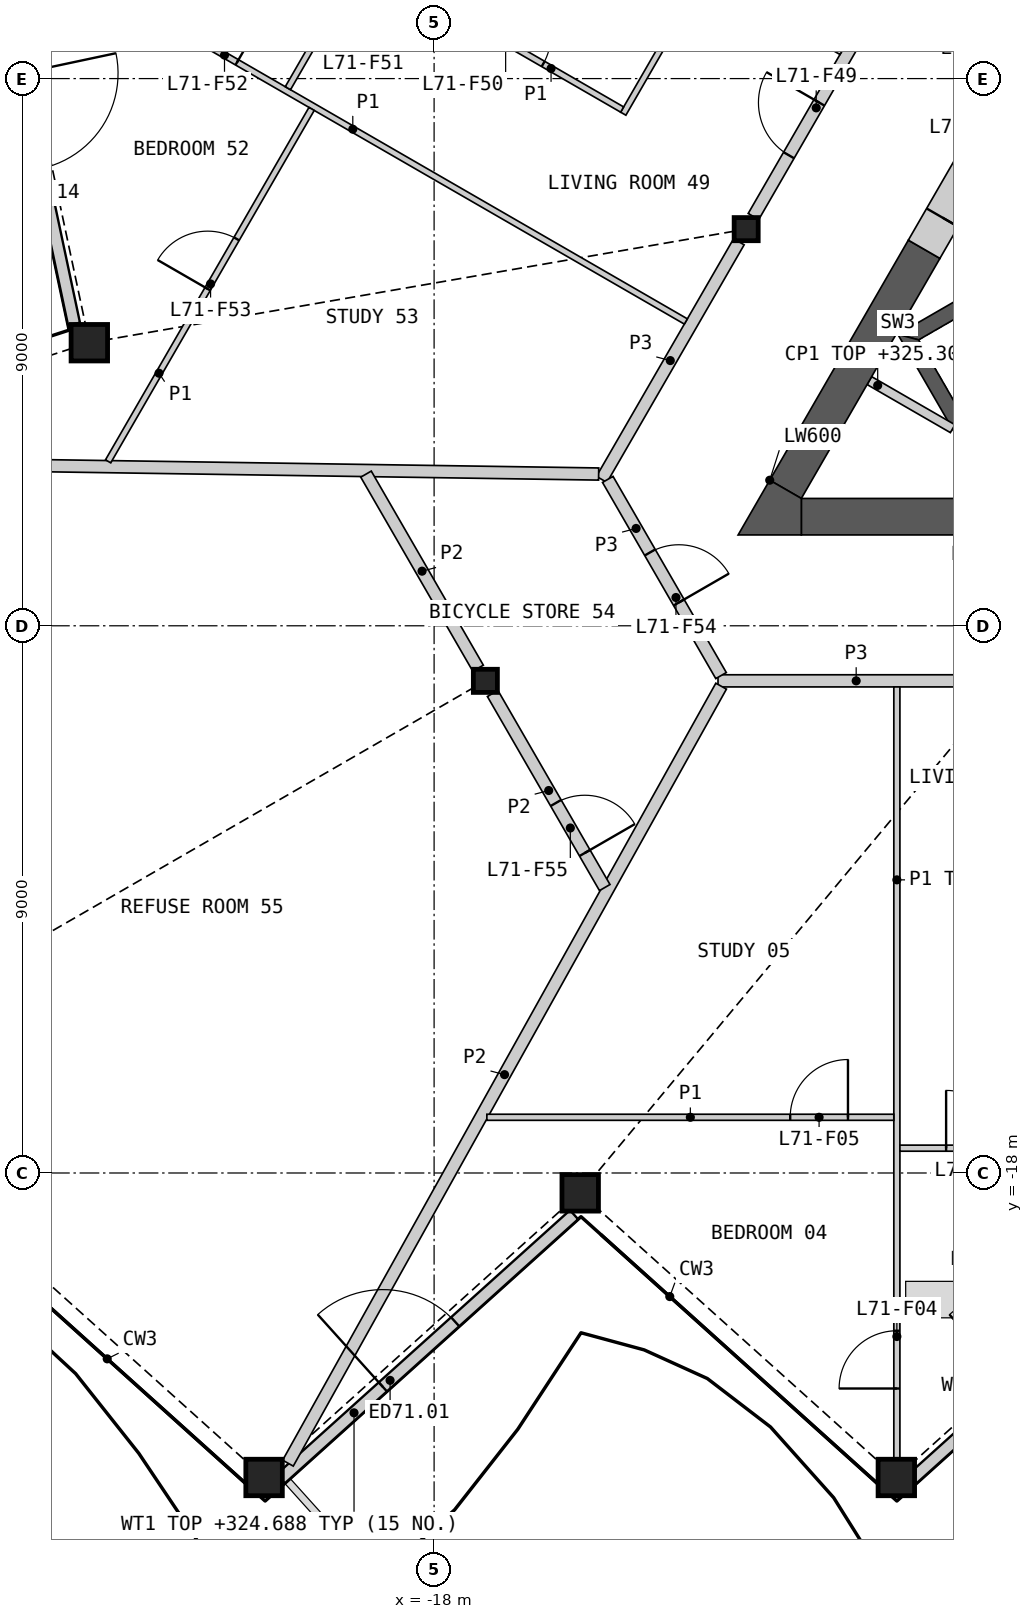
"""IFC4 building model, lengths in metres.
Left out: names, types, materials, properties, quantities, classifications, styles, units other than length and angle.
Written with IfcOpenShell. Run it as: python <this file> out.ifc"""

import sys

from ifc_helpers import new_model, si_unit, direction, frame, frame_2d, origin, origin_2d, place, context, subcontext, project, spatial, polyline, rectangle, hollow_rectangle, i_section, outline, extrude, element, fill, save


model = new_model("IFC4")
c1 = context("Model", 3, precision=1e-05, world=origin(), true_north=direction((0.0, 1.0)))
c2 = subcontext(c1, "Body", "Model", "MODEL_VIEW")
j1 = project(units=[si_unit("LENGTHUNIT", "METRE"), si_unit("PLANEANGLEUNIT", "RADIAN")], contexts=[c1])
p1 = place(None, origin())
s1 = spatial("IfcSite", under=j1, at=p1, CompositionType="ELEMENT")
p2 = place(p1, origin())
s2 = spatial("IfcBuilding", under=s1, at=p2, CompositionType="ELEMENT")
p3 = place(p2, frame((0.0, 0.0, 322.2)))
s3 = spatial("IfcBuildingStorey", under=s2, at=p3, CompositionType="ELEMENT", Elevation=322.2)
for number, where, z_axis, x_axis in (
    (1, (-20.796, -23.008, 0.0), (0.0, 0.0, 1.0), (1.0, 0.0, 0.0)),
    (2, (-15.597, -18.327, 0.0), (0.0, 0.0, 1.0), (1.0, 0.0, 0.0)),
    (3, (-10.398, -23.008, 0.0), (0.0, 0.0, 1.0), (1.0, 0.0, 0.0)),
    (4, (-23.67, -4.344, 0.0), (0.0, 0.0, 1.0), (1.0, 0.0, 0.0)),
):
    element("IfcColumn", number, at=place(p3, frame(where, z_axis=z_axis, x_axis=x_axis)), inside=s3, PredefinedType="COLUMN", context=c2, shape_type="SweptSolid", body=[
        extrude(hollow_rectangle(XDim=0.6, YDim=0.6, WallThickness=0.04, at=origin_2d()), origin(), (0.0, 0.0, 1.0), 3.4),
    ])
for number, where, z_axis, x_axis in (
    (5, (-12.868, -2.476, 0.0), (0.0, 0.0, 1.0), (1.0, 0.0, 0.0)),
    (6, (-17.157, -9.906, 0.0), (0.0, 0.0, 1.0), (1.0, 0.0, 0.0)),
):
    element("IfcColumn", number, at=place(p3, frame(where, z_axis=z_axis, x_axis=x_axis)), inside=s3, PredefinedType="COLUMN", context=c2, shape_type="SweptSolid", body=[
        extrude(i_section(OverallWidth=0.396, OverallDepth=0.381, WebThickness=0.019, FlangeThickness=0.03, at=origin_2d()), origin(), (0.0, 0.0, 1.0), 3.4),
    ])
p4 = place(p3, frame((-20.523, -23.031, 0.0), z_axis=(0.0, 0.0, 1.0), x_axis=(0.743138937876, 0.669137145145, 0.0)))
e7 = element("IfcWall", 7, at=p4, inside=s3, PredefinedType="SOLIDWALL", context=c2, shape_type="SweptSolid", body=[
    extrude(rectangle(XDim=6.493, YDim=0.2, at=frame_2d((3.246, 0.0))), origin(), (0.0, 0.0, 1.0), 2.488),
])
p5 = place(p4, frame((2.261, 0.0, 0.0)))
e8 = element("IfcOpeningElement", 8, at=p5, cuts=e7, PredefinedType="OPENING", context=c2, shape_type="SweptSolid", body=[
    extrude(rectangle(XDim=1.6, YDim=2.25, at=frame_2d((0.8, 1.125))), frame((0.0, 0.11, 0.0), z_axis=(0.0, -1.0, 0.0), x_axis=(1.0, 0.0, 0.0)), (0.0, 0.0, 1.0), 0.22),
])
p6 = place(p3, frame((-10.134, -23.031, 0.0), z_axis=(0.0, 0.0, 1.0), x_axis=(0.743138937876, 0.669137145145, 0.0)))
e9 = element("IfcWall", 9, at=p6, inside=s3, PredefinedType="SOLIDWALL", context=c2, shape_type="SweptSolid", body=[
    extrude(rectangle(XDim=6.493, YDim=0.2, at=frame_2d((3.246, 0.0))), origin(), (0.0, 0.0, 1.0), 2.488),
])
p7 = place(p6, frame((2.261, 0.0, 0.0)))
e10 = element("IfcOpeningElement", 10, at=p7, cuts=e9, PredefinedType="OPENING", context=c2, shape_type="SweptSolid", body=[
    extrude(rectangle(XDim=1.6, YDim=2.25, at=frame_2d((0.8, 1.125))), frame((0.0, 0.11, 0.0), z_axis=(0.0, -1.0, 0.0), x_axis=(1.0, 0.0, 0.0)), (0.0, 0.0, 1.0), 0.22),
])
p8 = place(p3, frame((-25.268, 2.297, 0.0), z_axis=(0.0, 0.0, 1.0), x_axis=(0.207937232358, -0.978142171363, 0.0)))
e11 = element("IfcWall", 11, at=p8, inside=s3, PredefinedType="SOLIDWALL", context=c2, shape_type="SweptSolid", body=[
    extrude(rectangle(XDim=6.474, YDim=0.2, at=frame_2d((3.237, 0.0))), origin(), (0.0, 0.0, 1.0), 2.488),
])
p9 = place(p8, frame((2.261, 0.0, 0.0)))
e12 = element("IfcOpeningElement", 12, at=p9, cuts=e11, PredefinedType="OPENING", context=c2, shape_type="SweptSolid", body=[
    extrude(rectangle(XDim=1.6, YDim=2.25, at=frame_2d((0.8, 1.125))), frame((0.0, 0.11, 0.0), z_axis=(0.0, -1.0, 0.0), x_axis=(1.0, 0.0, 0.0)), (0.0, 0.0, 1.0), 0.22),
])
p10 = place(p3, origin())
e13 = element("IfcWall", 13, at=p10, inside=s3, PredefinedType="SHEAR", context=c2, shape_type="SweptSolid", body=[
    extrude(outline(polyline([(-5.307, -1.281), (-10.374, -4.206), (-10.032, -4.298), (-5.182, -1.498), (-5.307, -1.281)])), origin(), (0.0, 0.0, 1.0), 3.1),
])
p11 = place(p3, origin())
e14 = element("IfcWall", 14, at=p11, inside=s3, PredefinedType="SHEAR", context=c2, shape_type="SweptSolid", body=[
    extrude(outline(polyline([(-10.374, -4.206), (-8.83, -6.881), (-8.738, -6.539), (-10.032, -4.298), (-10.374, -4.206)])), origin(), (0.0, 0.0, 1.0), 3.1),
])
p12 = place(p3, frame((-10.842, -4.967, 0.0), z_axis=(0.0, 0.0, 1.0), x_axis=(0.866098216386, -0.499873863663, 0.0)))
e15 = element("IfcWall", 15, at=p12, inside=s3, PredefinedType="PARTITIONING", context=c2, shape_type="SweptSolid", body=[
    extrude(rectangle(XDim=1.582, YDim=0.15, at=frame_2d((0.791, 0.0))), origin(), (0.0, 0.0, 1.0), 3.1),
])
p13 = place(p3, frame((-11.961, -7.206, 0.0), z_axis=(0.0, 0.0, 1.0), x_axis=(1.0, 0.0, 0.0)))
e16 = element("IfcWall", 16, at=p13, inside=s3, PredefinedType="SHEAR", context=c2, shape_type="SweptSolid", body=[
    extrude(rectangle(XDim=4.868, YDim=0.6, at=frame_2d((2.434, 0.0))), origin(), (0.0, 0.0, 1.0), 3.1),
])
p14 = place(p3, frame((-9.941, -2.807, 0.0), z_axis=(0.0, 0.0, 1.0), x_axis=(-0.500020646047, -0.866013483456, 0.0)))
e17 = element("IfcWall", 17, at=p14, inside=s3, PredefinedType="SHEAR", context=c2, shape_type="SweptSolid", body=[
    extrude(rectangle(XDim=4.559, YDim=0.6, at=frame_2d((2.28, 0.0))), origin(), (0.0, 0.0, 1.0), 3.1),
])
p15 = place(p3, origin())
e18 = element("IfcWall", 18, at=p15, inside=s3, PredefinedType="SHEAR", context=c2, shape_type="SweptSolid", body=[
    extrude(outline(polyline([(-12.48, -6.606), (-11.961, -6.906), (-11.961, -7.506), (-13.0, -7.506), (-12.48, -6.606)])), origin(), (0.0, 0.0, 1.0), 3.1),
])
p16 = place(p3, frame((-8.44, -0.208, 0.0), z_axis=(0.0, 0.0, 1.0), x_axis=(-0.499997052475, -0.866027105532, 0.0)))
e19 = element("IfcWall", 19, at=p16, inside=s3, PredefinedType="SHEAR", context=c2, shape_type="SweptSolid", body=[
    extrude(rectangle(XDim=3.001, YDim=0.6, at=frame_2d((1.501, 0.0))), origin(), (0.0, 0.0, 1.0), 3.1),
])
p17 = place(p16, frame((1.4, 0.0, 0.0)))
e20 = element("IfcOpeningElement", 20, at=p17, cuts=e19, PredefinedType="OPENING", context=c2, shape_type="SweptSolid", body=[
    extrude(rectangle(XDim=1.0, YDim=2.1, at=frame_2d((0.5, 1.05))), frame((0.0, 0.31, 0.0), z_axis=(0.0, -1.0, 0.0), x_axis=(1.0, 0.0, 0.0)), (0.0, 0.0, 1.0), 0.62),
])
p18 = place(p3, frame((-12.748, -2.269, 0.0), z_axis=(0.0, 0.0, 1.0), x_axis=(0.499984266882, 0.866034487114, 0.0)))
e21 = element("IfcWall", 21, at=p18, inside=s3, PredefinedType="PARTITIONING", context=c2, shape_type="SweptSolid", body=[
    extrude(rectangle(XDim=8.099, YDim=0.2, at=frame_2d((4.049, 0.0))), origin(), (0.0, 0.0, 1.0), 3.1),
])
p19 = place(p18, frame((1.164, 0.0, 0.0)))
e22 = element("IfcOpeningElement", 22, at=p19, cuts=e21, PredefinedType="OPENING", context=c2, shape_type="SweptSolid", body=[
    extrude(rectangle(XDim=1.0, YDim=2.1, at=frame_2d((0.5, 1.05))), frame((0.0, 0.11, 0.0), z_axis=(0.0, -1.0, 0.0), x_axis=(1.0, 0.0, 0.0)), (0.0, 0.0, 1.0), 0.22),
])
p20 = place(p3, frame((-13.331, -9.906, 0.0), z_axis=(0.0, 0.0, 1.0), x_axis=(1.0, 0.0, 0.0)))
e23 = element("IfcWall", 23, at=p20, inside=s3, PredefinedType="PARTITIONING", context=c2, shape_type="SweptSolid", body=[
    extrude(rectangle(XDim=4.545, YDim=0.2, at=frame_2d((2.272, 0.0))), origin(), (0.0, 0.0, 1.0), 3.1),
])
p21 = place(p3, frame((-15.244, -6.592, 0.0), z_axis=(0.0, 0.0, 1.0), x_axis=(0.49999094734, 0.866030630277, 0.0)))
e24 = element("IfcWall", 24, at=p21, inside=s3, PredefinedType="PARTITIONING", context=c2, shape_type="SweptSolid", body=[
    extrude(rectangle(XDim=4.513, YDim=0.2, at=frame_2d((2.256, 0.0))), origin(), (0.0, 0.0, 1.0), 3.1),
])
p22 = place(p3, frame((-15.144, -6.592, 0.0), z_axis=(0.0, 0.0, 1.0), x_axis=(0.499958791762, -0.866049194065, 0.0)))
e25 = element("IfcWall", 25, at=p22, inside=s3, PredefinedType="PARTITIONING", context=c2, shape_type="SweptSolid", body=[
    extrude(rectangle(XDim=3.726, YDim=0.2, at=frame_2d((1.863, 0.0))), origin(), (0.0, 0.0, 1.0), 3.1),
])
p23 = place(p22, frame((1.388, 0.0, 0.0)))
e26 = element("IfcOpeningElement", 26, at=p23, cuts=e25, PredefinedType="OPENING", context=c2, shape_type="SweptSolid", body=[
    extrude(rectangle(XDim=0.95, YDim=2.1, at=frame_2d((0.475, 1.05))), frame((0.0, 0.11, 0.0), z_axis=(0.0, -1.0, 0.0), x_axis=(1.0, 0.0, 0.0)), (0.0, 0.0, 1.0), 0.22),
])
p24 = place(p3, frame((-13.471, 1.779, 0.0), z_axis=(0.0, 0.0, 1.0), x_axis=(0.865989465428, -0.500062241894, 0.0)))
e27 = element("IfcWall", 27, at=p24, inside=s3, PredefinedType="PARTITIONING", context=c2, shape_type="SweptSolid", body=[
    extrude(rectangle(XDim=2.55, YDim=0.25, at=frame_2d((1.275, 0.0))), origin(), (0.0, 0.0, 1.0), 2.33),
])
p25 = place(p3, frame((-20.404, -22.772, 0.0), z_axis=(0.0, 0.0, 1.0), x_axis=(0.486917529285, 0.873447949036, 0.0)))
e28 = element("IfcWall", 28, at=p25, inside=s3, PredefinedType="PARTITIONING", context=c2, shape_type="SweptSolid", body=[
    extrude(rectangle(XDim=14.631, YDim=0.2, at=frame_2d((7.315, 0.0))), origin(), (0.0, 0.0, 1.0), 2.33),
])
p26 = place(p3, frame((-30.014, -6.282, 0.0), z_axis=(0.0, 0.0, 1.0), x_axis=(0.99988686643, -0.015041753265, 0.0)))
e29 = element("IfcWall", 29, at=p26, inside=s3, PredefinedType="PARTITIONING", context=c2, shape_type="SweptSolid", body=[
    extrude(rectangle(XDim=14.721, YDim=0.2, at=frame_2d((7.361, 0.0))), origin(), (0.0, 0.0, 1.0), 2.33),
])
p27 = place(p3, frame((-17.037, -10.113, 0.0), z_axis=(0.0, 0.0, 1.0), x_axis=(0.50002820729, -0.866009117685, 0.0)))
e30 = element("IfcWall", 30, at=p27, inside=s3, PredefinedType="PARTITIONING", context=c2, shape_type="SweptSolid", body=[
    extrude(rectangle(XDim=3.686, YDim=0.2, at=frame_2d((1.843, 0.0))), origin(), (0.0, 0.0, 1.0), 2.33),
])
p28 = place(p27, frame((2.08, 0.0, 0.0)))
e31 = element("IfcOpeningElement", 31, at=p28, cuts=e30, PredefinedType="OPENING", context=c2, shape_type="SweptSolid", body=[
    extrude(rectangle(XDim=0.95, YDim=2.1, at=frame_2d((0.475, 1.05))), frame((0.0, 0.11, 0.0), z_axis=(0.0, -1.0, 0.0), x_axis=(1.0, 0.0, 0.0)), (0.0, 0.0, 1.0), 0.22),
])
p29 = place(p3, frame((-19.12, -6.506, 0.0), z_axis=(0.0, 0.0, 1.0), x_axis=(0.499978535015, -0.866037796245, 0.0)))
e32 = element("IfcWall", 32, at=p29, inside=s3, PredefinedType="PARTITIONING", context=c2, shape_type="SweptSolid", body=[
    extrude(rectangle(XDim=3.686, YDim=0.2, at=frame_2d((1.843, 0.0))), origin(), (0.0, 0.0, 1.0), 2.33),
])
p30 = place(p3, frame((-10.389, -22.698, 0.0), z_axis=(0.0, 0.0, 1.0), x_axis=(0.0, 1.0, 0.0)))
e33 = element("IfcWall", 33, at=p30, inside=s3, PredefinedType="PARTITIONING", context=c2, shape_type="SweptSolid", body=[
    extrude(rectangle(XDim=12.692, YDim=0.1, at=frame_2d((6.346, 0.0))), origin(), (0.0, 0.0, 1.0), 2.33),
])
p31 = place(p30, frame((1.153, 0.0, 0.0)))
e34 = element("IfcOpeningElement", 34, at=p31, cuts=e33, PredefinedType="OPENING", context=c2, shape_type="SweptSolid", body=[
    extrude(rectangle(XDim=0.95, YDim=2.1, at=frame_2d((0.475, 1.05))), frame((0.0, 0.06, 0.0), z_axis=(0.0, -1.0, 0.0), x_axis=(1.0, 0.0, 0.0)), (0.0, 0.0, 1.0), 0.12),
])
p32 = place(p3, frame((-24.815, 2.33, 0.0), z_axis=(0.0, 0.0, 1.0), x_axis=(0.866027776657, -0.499995890042, 0.0)))
e35 = element("IfcWall", 35, at=p32, inside=s3, PredefinedType="PARTITIONING", context=c2, shape_type="SweptSolid", body=[
    extrude(rectangle(XDim=12.649, YDim=0.1, at=frame_2d((6.325, 0.0))), origin(), (0.0, 0.0, 1.0), 2.33),
])
p33 = place(p32, frame((3.176, 0.0, 0.0)))
e36 = element("IfcOpeningElement", 36, at=p33, cuts=e35, PredefinedType="OPENING", context=c2, shape_type="SweptSolid", body=[
    extrude(rectangle(XDim=0.95, YDim=2.1, at=frame_2d((0.475, 1.05))), frame((0.0, 0.06, 0.0), z_axis=(0.0, -1.0, 0.0), x_axis=(1.0, 0.0, 0.0)), (0.0, 0.0, 1.0), 0.12),
])
p34 = place(p3, frame((-23.361, -6.295, 0.0), z_axis=(0.0, 0.0, 1.0), x_axis=(0.499987686533, 0.866032512851, 0.0)))
e37 = element("IfcWall", 37, at=p34, inside=s3, PredefinedType="PARTITIONING", context=c2, shape_type="SweptSolid", body=[
    extrude(rectangle(XDim=6.693, YDim=0.1, at=frame_2d((3.347, 0.0))), origin(), (0.0, 0.0, 1.0), 2.33),
])
p35 = place(p34, frame((3.275, 0.0, 0.0)))
e38 = element("IfcOpeningElement", 38, at=p35, cuts=e37, PredefinedType="OPENING", context=c2, shape_type="SweptSolid", body=[
    extrude(rectangle(XDim=0.95, YDim=2.1, at=frame_2d((0.475, 1.05))), frame((0.0, 0.06, 0.0), z_axis=(0.0, -1.0, 0.0), x_axis=(1.0, 0.0, 0.0)), (0.0, 0.0, 1.0), 0.12),
])
p36 = place(p3, frame((-17.132, -17.084, 0.0), z_axis=(0.0, 0.0, 1.0), x_axis=(1.0, 0.0, 0.0)))
e39 = element("IfcWall", 39, at=p36, inside=s3, PredefinedType="PARTITIONING", context=c2, shape_type="SweptSolid", body=[
    extrude(rectangle(XDim=6.693, YDim=0.1, at=frame_2d((3.346, 0.0))), origin(), (0.0, 0.0, 1.0), 2.33),
])
p37 = place(p36, frame((4.989, 0.0, 0.0)))
e40 = element("IfcOpeningElement", 40, at=p37, cuts=e39, PredefinedType="OPENING", context=c2, shape_type="SweptSolid", body=[
    extrude(rectangle(XDim=0.95, YDim=2.1, at=frame_2d((0.475, 1.05))), frame((0.0, 0.06, 0.0), z_axis=(0.0, -1.0, 0.0), x_axis=(1.0, 0.0, 0.0)), (0.0, 0.0, 1.0), 0.12),
])
p38 = place(p3, frame((-14.889, -0.577, 0.0), z_axis=(0.0, 0.0, 1.0), x_axis=(0.500015767406, 0.866016300277, 0.0)))
e41 = element("IfcWall", 41, at=p38, inside=s3, PredefinedType="PARTITIONING", context=c2, shape_type="SweptSolid", body=[
    extrude(rectangle(XDim=5.5, YDim=0.1, at=frame_2d((2.75, 0.0))), origin(), (0.0, 0.0, 1.0), 2.33),
])
p39 = place(p3, frame((-10.339, -17.592, 0.0), z_axis=(0.0, 0.0, 1.0), x_axis=(1.0, 0.0, 0.0)))
e42 = element("IfcWall", 42, at=p39, inside=s3, PredefinedType="PARTITIONING", context=c2, shape_type="SweptSolid", body=[
    extrude(rectangle(XDim=5.02, YDim=0.1, at=frame_2d((2.51, 0.0))), origin(), (0.0, 0.0, 1.0), 2.33),
])
p40 = place(p39, frame((0.76, 0.0, 0.0)))
e43 = element("IfcOpeningElement", 43, at=p40, cuts=e42, PredefinedType="OPENING", context=c2, shape_type="SweptSolid", body=[
    extrude(rectangle(XDim=0.95, YDim=2.1, at=frame_2d((0.475, 1.05))), frame((0.0, 0.06, 0.0), z_axis=(0.0, -1.0, 0.0), x_axis=(1.0, 0.0, 0.0)), (0.0, 0.0, 1.0), 0.12),
])
p41 = place(p3, frame((-20.405, -0.158, 0.0), z_axis=(0.0, 0.0, 1.0), x_axis=(0.499989096993, 0.866031698547, 0.0)))
e44 = element("IfcWall", 44, at=p41, inside=s3, PredefinedType="PARTITIONING", context=c2, shape_type="SweptSolid", body=[
    extrude(rectangle(XDim=5.02, YDim=0.1, at=frame_2d((2.51, 0.0))), origin(), (0.0, 0.0, 1.0), 2.33),
])
p42 = place(p41, frame((0.862, 0.0, 0.0)))
e45 = element("IfcOpeningElement", 45, at=p42, cuts=e44, PredefinedType="OPENING", context=c2, shape_type="SweptSolid", body=[
    extrude(rectangle(XDim=0.95, YDim=2.1, at=frame_2d((0.475, 1.05))), frame((0.0, 0.06, 0.0), z_axis=(0.0, -1.0, 0.0), x_axis=(1.0, 0.0, 0.0)), (0.0, 0.0, 1.0), 0.12),
])
p43 = place(p3, frame((-17.246, 0.841, 0.0), z_axis=(0.0, 0.0, 1.0), x_axis=(0.86599734893, -0.500048589285, 0.0)))
e46 = element("IfcWall", 46, at=p43, inside=s3, PredefinedType="PARTITIONING", context=c2, shape_type="SweptSolid", body=[
    extrude(rectangle(XDim=2.7, YDim=0.1, at=frame_2d((1.35, 0.0))), origin(), (0.0, 0.0, 1.0), 2.33),
])
p44 = place(p43, frame((0.25, 0.0, 0.0)))
e47 = element("IfcOpeningElement", 47, at=p44, cuts=e46, PredefinedType="OPENING", context=c2, shape_type="SweptSolid", body=[
    extrude(rectangle(XDim=0.95, YDim=2.1, at=frame_2d((0.475, 1.05))), frame((0.0, 0.06, 0.0), z_axis=(0.0, -1.0, 0.0), x_axis=(1.0, 0.0, 0.0)), (0.0, 0.0, 1.0), 0.12),
])
p45 = place(p5, origin())
e48 = element("IfcDoor", 48, at=p45, inside=s3, OperationType="DOUBLE_DOOR_SINGLE_SWING", PredefinedType="DOOR", context=c2, shape_type="SweptSolid", body=[
    extrude(rectangle(XDim=1.6, YDim=2.25, at=frame_2d((0.8, 1.125))), frame((0.0, 0.025, 0.0), z_axis=(0.0, -1.0, 0.0), x_axis=(1.0, 0.0, 0.0)), (0.0, 0.0, 1.0), 0.05),
])
fill(e8, e48)
p46 = place(p17, origin())
e49 = element("IfcDoor", 49, at=p46, inside=s3, OperationType="SINGLE_SWING_RIGHT", PredefinedType="DOOR", context=c2, shape_type="SweptSolid", body=[
    extrude(rectangle(XDim=1.0, YDim=2.1, at=frame_2d((0.5, 1.05))), frame((0.0, 0.055, 0.0), z_axis=(0.0, -1.0, 0.0), x_axis=(1.0, 0.0, 0.0)), (0.0, 0.0, 1.0), 0.05),
])
fill(e20, e49)
p47 = place(p40, origin())
e50 = element("IfcDoor", 50, at=p47, inside=s3, OperationType="SINGLE_SWING_LEFT", PredefinedType="DOOR", context=c2, shape_type="SweptSolid", body=[
    extrude(rectangle(XDim=0.95, YDim=2.1, at=frame_2d((0.475, 1.05))), frame((0.0, 0.025, 0.0), z_axis=(0.0, -1.0, 0.0), x_axis=(1.0, 0.0, 0.0)), (0.0, 0.0, 1.0), 0.05),
])
fill(e43, e50)
p48 = place(p31, origin())
e51 = element("IfcDoor", 51, at=p48, inside=s3, OperationType="SINGLE_SWING_LEFT", PredefinedType="DOOR", context=c2, shape_type="SweptSolid", body=[
    extrude(rectangle(XDim=0.95, YDim=2.1, at=frame_2d((0.475, 1.05))), frame((0.0, 0.025, 0.0), z_axis=(0.0, -1.0, 0.0), x_axis=(1.0, 0.0, 0.0)), (0.0, 0.0, 1.0), 0.05),
])
fill(e34, e51)
p49 = place(p37, origin())
e52 = element("IfcDoor", 52, at=p49, inside=s3, OperationType="SINGLE_SWING_RIGHT", PredefinedType="DOOR", context=c2, shape_type="SweptSolid", body=[
    extrude(rectangle(XDim=0.95, YDim=2.1, at=frame_2d((0.475, 1.05))), frame((0.0, 0.025, 0.0), z_axis=(0.0, -1.0, 0.0), x_axis=(1.0, 0.0, 0.0)), (0.0, 0.0, 1.0), 0.05),
])
fill(e40, e52)
p50 = place(p19, origin())
e53 = element("IfcDoor", 53, at=p50, inside=s3, OperationType="SINGLE_SWING_RIGHT", PredefinedType="DOOR", context=c2, shape_type="SweptSolid", body=[
    extrude(rectangle(XDim=1.0, YDim=2.1, at=frame_2d((0.5, 1.05))), frame((0.0, 0.025, 0.0), z_axis=(0.0, -1.0, 0.0), x_axis=(1.0, 0.0, 0.0)), (0.0, 0.0, 1.0), 0.05),
])
fill(e22, e53)
p51 = place(p44, origin())
e54 = element("IfcDoor", 54, at=p51, inside=s3, OperationType="SINGLE_SWING_LEFT", PredefinedType="DOOR", context=c2, shape_type="SweptSolid", body=[
    extrude(rectangle(XDim=0.95, YDim=2.1, at=frame_2d((0.475, 1.05))), frame((0.0, 0.025, 0.0), z_axis=(0.0, -1.0, 0.0), x_axis=(1.0, 0.0, 0.0)), (0.0, 0.0, 1.0), 0.05),
])
fill(e47, e54)
p52 = place(p33, origin())
e55 = element("IfcDoor", 55, at=p52, inside=s3, OperationType="SINGLE_SWING_RIGHT", PredefinedType="DOOR", context=c2, shape_type="SweptSolid", body=[
    extrude(rectangle(XDim=0.95, YDim=2.1, at=frame_2d((0.475, 1.05))), frame((0.0, 0.025, 0.0), z_axis=(0.0, -1.0, 0.0), x_axis=(1.0, 0.0, 0.0)), (0.0, 0.0, 1.0), 0.05),
])
fill(e36, e55)
p53 = place(p35, origin())
e56 = element("IfcDoor", 56, at=p53, inside=s3, OperationType="SINGLE_SWING_LEFT", PredefinedType="DOOR", context=c2, shape_type="SweptSolid", body=[
    extrude(rectangle(XDim=0.95, YDim=2.1, at=frame_2d((0.475, 1.05))), frame((0.0, 0.025, 0.0), z_axis=(0.0, -1.0, 0.0), x_axis=(1.0, 0.0, 0.0)), (0.0, 0.0, 1.0), 0.05),
])
fill(e38, e56)
p54 = place(p23, origin())
e57 = element("IfcDoor", 57, at=p54, inside=s3, OperationType="SINGLE_SWING_RIGHT", PredefinedType="DOOR", context=c2, shape_type="SweptSolid", body=[
    extrude(rectangle(XDim=0.95, YDim=2.1, at=frame_2d((0.475, 1.05))), frame((0.0, 0.025, 0.0), z_axis=(0.0, -1.0, 0.0), x_axis=(1.0, 0.0, 0.0)), (0.0, 0.0, 1.0), 0.05),
])
fill(e26, e57)
p55 = place(p28, origin())
e58 = element("IfcDoor", 58, at=p55, inside=s3, OperationType="SINGLE_SWING_RIGHT", PredefinedType="DOOR", context=c2, shape_type="SweptSolid", body=[
    extrude(rectangle(XDim=0.95, YDim=2.1, at=frame_2d((0.475, 1.05))), frame((0.0, 0.025, 0.0), z_axis=(0.0, -1.0, 0.0), x_axis=(1.0, 0.0, 0.0)), (0.0, 0.0, 1.0), 0.05),
])
fill(e31, e58)
save(model, sys.argv[1])
